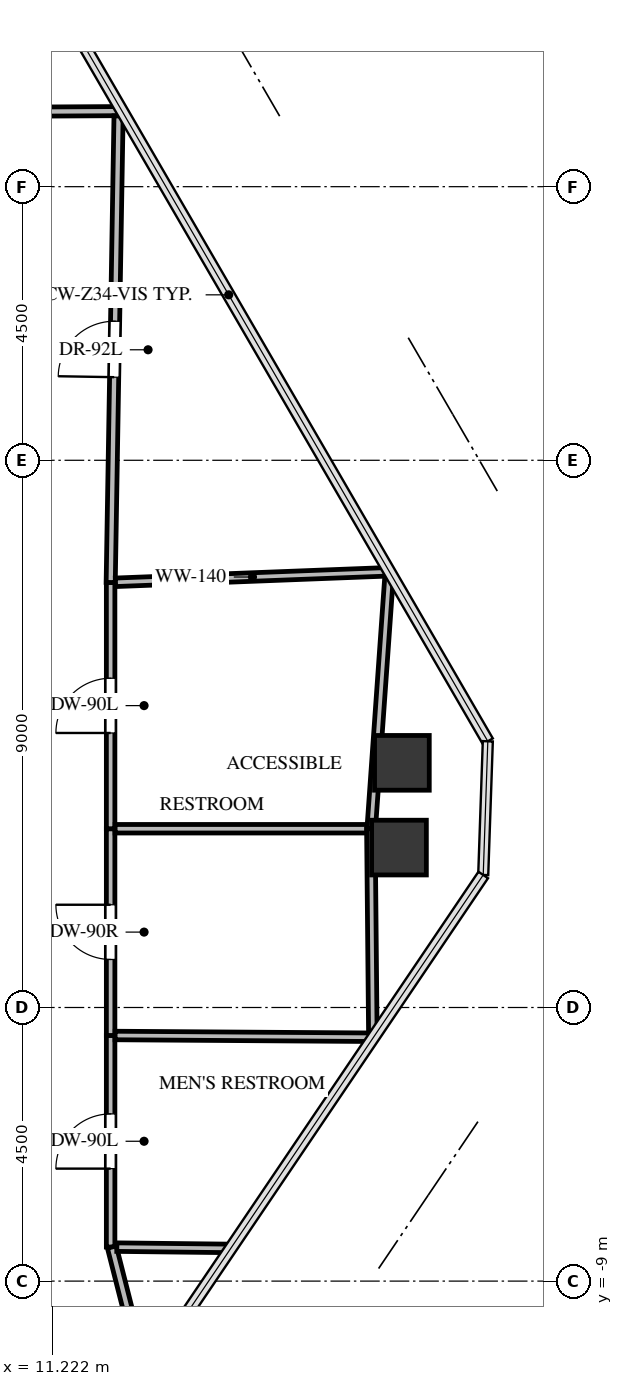
"""IFC4 building model, lengths in metres.
Left out: names, types, materials, properties, quantities, classifications, styles, units other than length and angle.
Written with IfcOpenShell. Run it as: python <this file> out.ifc"""

import sys

from ifc_helpers import new_model, si_unit, direction, frame, frame_2d, origin, origin_2d, place, context, subcontext, project, spatial, rectangle, extrude, source, transform, mapped, element, fill, save


model = new_model("IFC4")
c1 = context("Model", 3, precision=1e-05, world=origin(), true_north=direction((0.0, 1.0)))
c2 = subcontext(c1, "Body", "Model", "MODEL_VIEW")
j1 = project(units=[si_unit("LENGTHUNIT", "METRE"), si_unit("PLANEANGLEUNIT", "RADIAN")], contexts=[c1])
p1 = place(None, origin())
s1 = spatial("IfcSite", under=j1, at=p1, CompositionType="ELEMENT")
p2 = place(p1, origin())
s2 = spatial("IfcBuilding", under=s1, at=p2, CompositionType="ELEMENT")
p3 = place(p2, frame((0.0, 0.0, 248.0)))
s3 = spatial("IfcBuildingStorey", under=s2, at=p3, CompositionType="ELEMENT", Elevation=248.0)
m1 = source(origin(), c2, "Body", "SweptSolid", [
    extrude(rectangle(XDim=0.9, YDim=0.9, at=origin_2d()), origin(), (0.0, 0.0, 1.0), 3.3),
])
for number, where, z_axis, x_axis in (
    (1, (16.97, -0.476, -0.24), (0.0, 0.0, 1.0), (1.0, 0.0, 0.0)),
    (2, (16.922, -1.87, -0.24), (0.0, 0.0, 1.0), (1.0, 0.0, 0.0)),
):
    element("IfcColumn", number, at=place(p3, frame(where, z_axis=z_axis, x_axis=x_axis)), inside=s3, PredefinedType="COLUMN", context=c2, shape_type="MappedRepresentation", body=[
        mapped(m1, transform((0.0, 0.0, 0.0), x_axis=(1.0, 0.0, 0.0), y_axis=(0.0, 1.0, 0.0), z_axis=(0.0, 0.0, 1.0), scale=1.0)),
    ])
p4 = place(p3, frame((12.18, -8.44, 0.0), z_axis=(0.0, 0.0, 1.0), x_axis=(0.0, 1.0, 0.0)))
e3 = element("IfcWall", 3, at=p4, inside=s3, PredefinedType="PARTITIONING", context=c2, shape_type="SweptSolid", body=[
    extrude(rectangle(XDim=3.48, YDim=0.14, at=frame_2d((1.74, 0.0))), origin(), (0.0, 0.0, 1.0), 2.399),
])
p5 = place(p4, frame((1.29, 0.0, 0.0)))
e4 = element("IfcOpeningElement", 4, at=p5, cuts=e3, PredefinedType="OPENING", context=c2, shape_type="SweptSolid", body=[
    extrude(rectangle(XDim=0.9, YDim=2.05, at=frame_2d((0.45, 1.025))), frame((0.0, 0.08, 0.0), z_axis=(0.0, -1.0, 0.0), x_axis=(1.0, 0.0, 0.0)), (0.0, 0.0, 1.0), 0.16),
])
p6 = place(p3, frame((12.18, -4.96, 0.0), z_axis=(0.0, 0.0, 1.0), x_axis=(0.0, 1.0, 0.0)))
e5 = element("IfcWall", 5, at=p6, inside=s3, PredefinedType="PARTITIONING", context=c2, shape_type="SweptSolid", body=[
    extrude(rectangle(XDim=3.4, YDim=0.14, at=frame_2d((1.7, 0.0))), origin(), (0.0, 0.0, 1.0), 3.045),
])
p7 = place(p6, frame((1.25, 0.0, 0.0)))
e6 = element("IfcOpeningElement", 6, at=p7, cuts=e5, PredefinedType="OPENING", context=c2, shape_type="SweptSolid", body=[
    extrude(rectangle(XDim=0.9, YDim=2.05, at=frame_2d((0.45, 1.025))), frame((0.0, 0.08, 0.0), z_axis=(0.0, -1.0, 0.0), x_axis=(1.0, 0.0, 0.0)), (0.0, 0.0, 1.0), 0.16),
])
p8 = place(p3, frame((12.18, -1.56, 0.0), z_axis=(0.0, 0.0, 1.0), x_axis=(0.0, 1.0, 0.0)))
e7 = element("IfcWall", 7, at=p8, inside=s3, PredefinedType="PARTITIONING", context=c2, shape_type="SweptSolid", body=[
    extrude(rectangle(XDim=4.05, YDim=0.14, at=frame_2d((2.025, 0.0))), origin(), (0.0, 0.0, 1.0), 2.301),
])
p9 = place(p8, frame((1.575, 0.0, 0.0)))
e8 = element("IfcOpeningElement", 8, at=p9, cuts=e7, PredefinedType="OPENING", context=c2, shape_type="SweptSolid", body=[
    extrude(rectangle(XDim=0.9, YDim=2.05, at=frame_2d((0.45, 1.025))), frame((0.0, 0.08, 0.0), z_axis=(0.0, -1.0, 0.0), x_axis=(1.0, 0.0, 0.0)), (0.0, 0.0, 1.0), 0.16),
])
p10 = place(p3, frame((12.368, 10.243, 0.0), z_axis=(0.0, 0.0, 1.0), x_axis=(-0.999984623931, -0.005545439622, 0.0)))
e9 = element("IfcWall", 9, at=p10, inside=s3, PredefinedType="PARTITIONING", context=c2, shape_type="SweptSolid", body=[
    extrude(rectangle(XDim=11.359, YDim=0.15, at=frame_2d((5.679, 0.0))), origin(), (0.0, 0.0, 1.0), 2.301),
])
p11 = place(p10, frame((5.204, 0.0, 0.0)))
e10 = element("IfcOpeningElement", 10, at=p11, cuts=e9, PredefinedType="OPENING", context=c2, shape_type="SweptSolid", body=[
    extrude(rectangle(XDim=0.95, YDim=2.1, at=frame_2d((0.475, 1.05))), frame((0.0, 0.085, 0.0), z_axis=(0.0, -1.0, 0.0), x_axis=(1.0, 0.0, 0.0)), (0.0, 0.0, 1.0), 0.17),
])
p12 = place(p3, frame((12.719, -10.477, 0.0), z_axis=(0.0, 0.0, 1.0), x_axis=(-0.246550381988, 0.96912997536, 0.0)))
e11 = element("IfcWall", 11, at=p12, inside=s3, PredefinedType="PARTITIONING", context=c2, shape_type="SweptSolid", body=[
    extrude(rectangle(XDim=2.102, YDim=0.15, at=frame_2d((1.051, 0.0))), origin(), (0.0, 0.0, 1.0), 2.399),
])
p13 = place(p3, frame((12.181, 2.49, 0.0), z_axis=(0.0, 0.0, 1.0), x_axis=(0.016828134389, 0.999858396921, 0.0)))
e12 = element("IfcWall", 12, at=p13, inside=s3, PredefinedType="PARTITIONING", context=c2, shape_type="SweptSolid", body=[
    extrude(rectangle(XDim=7.675, YDim=0.15, at=frame_2d((3.837, 0.0))), origin(), (0.0, 0.0, 1.0), 2.399),
])
p14 = place(p13, frame((3.377, 0.0, 0.0)))
e13 = element("IfcOpeningElement", 13, at=p14, cuts=e12, PredefinedType="OPENING", context=c2, shape_type="SweptSolid", body=[
    extrude(rectangle(XDim=0.92, YDim=2.1, at=frame_2d((0.46, 1.05))), frame((0.0, 0.085, 0.0), z_axis=(0.0, -1.0, 0.0), x_axis=(1.0, 0.0, 0.0)), (0.0, 0.0, 1.0), 0.17),
])
p15 = place(p3, frame((12.254, -4.96, 0.0), z_axis=(0.0, 0.0, 1.0), x_axis=(0.999976630429, -0.006836563198, 0.0)))
e14 = element("IfcWall", 14, at=p15, inside=s3, PredefinedType="PARTITIONING", context=c2, shape_type="SweptSolid", body=[
    extrude(rectangle(XDim=4.25, YDim=0.14, at=frame_2d((2.125, 0.0))), origin(), (0.0, 0.0, 1.0), 2.399),
])
p16 = place(p3, frame((14.156, -8.462, 0.0), z_axis=(0.0, 0.0, 1.0), x_axis=(-0.999935742613, 0.011336253532, 0.0)))
e15 = element("IfcWall", 15, at=p16, inside=s3, PredefinedType="PARTITIONING", context=c2, shape_type="SweptSolid", body=[
    extrude(rectangle(XDim=1.874, YDim=0.14, at=frame_2d((0.937, 0.0))), origin(), (0.0, 0.0, 1.0), 2.399),
])
p17 = place(p3, frame((12.254, -1.56, 0.0), z_axis=(0.0, 0.0, 1.0), x_axis=(1.0, 0.0, 0.0)))
e16 = element("IfcWall", 16, at=p17, inside=s3, PredefinedType="PARTITIONING", context=c2, shape_type="SweptSolid", body=[
    extrude(rectangle(XDim=4.206, YDim=0.14, at=frame_2d((2.103, 0.0))), origin(), (0.0, 0.0, 1.0), 2.301),
])
p18 = place(p3, frame((16.46, -1.56, 0.0), z_axis=(0.0, 0.0, 1.0), x_axis=(0.009604446748, -0.999953876238, 0.0)))
e17 = element("IfcWall", 17, at=p18, inside=s3, PredefinedType="PARTITIONING", context=c2, shape_type="SweptSolid", body=[
    extrude(rectangle(XDim=3.355, YDim=0.14, at=frame_2d((1.678, 0.0))), origin(), (0.0, 0.0, 1.0), 2.301),
])
p19 = place(p3, frame((12.26, 2.493, 0.0), z_axis=(0.0, 0.0, 1.0), x_axis=(0.999256206289, 0.038562082324, 0.0)))
e18 = element("IfcWall", 18, at=p19, inside=s3, PredefinedType="PARTITIONING", context=c2, shape_type="SweptSolid", body=[
    extrude(rectangle(XDim=4.508, YDim=0.14, at=frame_2d((2.254, 0.0))), origin(), (0.0, 0.0, 1.0), 2.399),
])
p20 = place(p3, frame((16.76, 2.593, 0.0), z_axis=(0.0, 0.0, 1.0), x_axis=(-0.07055102187, -0.997508172053, 0.0)))
e19 = element("IfcWall", 19, at=p20, inside=s3, PredefinedType="PARTITIONING", context=c2, shape_type="SweptSolid", body=[
    extrude(rectangle(XDim=4.163, YDim=0.14, at=frame_2d((2.082, 0.0))), origin(), (0.0, 0.0, 1.0), 2.301),
])
m2 = source(origin(), c2, "Body", "SweptSolid", [
    extrude(rectangle(XDim=0.9, YDim=2.05, at=frame_2d((0.45, 1.025))), frame((0.0, 0.025, 0.0), z_axis=(0.0, -1.0, 0.0), x_axis=(1.0, 0.0, 0.0)), (0.0, 0.0, 1.0), 0.05),
])
p21 = place(p5, origin())
e20 = element("IfcDoor", 20, at=p21, inside=s3, OperationType="SINGLE_SWING_LEFT", PredefinedType="DOOR", context=c2, shape_type="MappedRepresentation", body=[
    mapped(m2, transform((0.0, 0.0, 0.0), x_axis=(1.0, 0.0, 0.0), y_axis=(0.0, 1.0, 0.0), z_axis=(0.0, 0.0, 1.0), scale=1.0)),
])
fill(e4, e20)
m3 = source(origin(), c2, "Body", "SweptSolid", [
    extrude(rectangle(XDim=0.9, YDim=2.05, at=frame_2d((0.45, 1.025))), frame((0.0, 0.025, 0.0), z_axis=(0.0, -1.0, 0.0), x_axis=(1.0, 0.0, 0.0)), (0.0, 0.0, 1.0), 0.05),
])
p22 = place(p7, origin())
e21 = element("IfcDoor", 21, at=p22, inside=s3, OperationType="SINGLE_SWING_RIGHT", PredefinedType="DOOR", context=c2, shape_type="MappedRepresentation", body=[
    mapped(m3, transform((0.0, 0.0, 0.0), x_axis=(1.0, 0.0, 0.0), y_axis=(0.0, 1.0, 0.0), z_axis=(0.0, 0.0, 1.0), scale=1.0)),
])
fill(e6, e21)
p23 = place(p9, origin())
e22 = element("IfcDoor", 22, at=p23, inside=s3, OperationType="SINGLE_SWING_LEFT", PredefinedType="DOOR", context=c2, shape_type="MappedRepresentation", body=[
    mapped(m2, transform((0.0, 0.0, 0.0), x_axis=(1.0, 0.0, 0.0), y_axis=(0.0, 1.0, 0.0), z_axis=(0.0, 0.0, 1.0), scale=1.0)),
])
fill(e8, e22)
m4 = source(origin(), c2, "Body", "SweptSolid", [
    extrude(rectangle(XDim=0.92, YDim=2.1, at=frame_2d((0.46, 1.05))), frame((0.0, 0.025, 0.0), z_axis=(0.0, -1.0, 0.0), x_axis=(1.0, 0.0, 0.0)), (0.0, 0.0, 1.0), 0.05),
])
p24 = place(p14, origin())
e23 = element("IfcDoor", 23, at=p24, inside=s3, OperationType="SINGLE_SWING_LEFT", PredefinedType="DOOR", context=c2, shape_type="MappedRepresentation", body=[
    mapped(m4, transform((0.0, 0.0, 0.0), x_axis=(1.0, 0.0, 0.0), y_axis=(0.0, 1.0, 0.0), z_axis=(0.0, 0.0, 1.0), scale=1.0)),
])
fill(e13, e23)
save(model, sys.argv[1])
